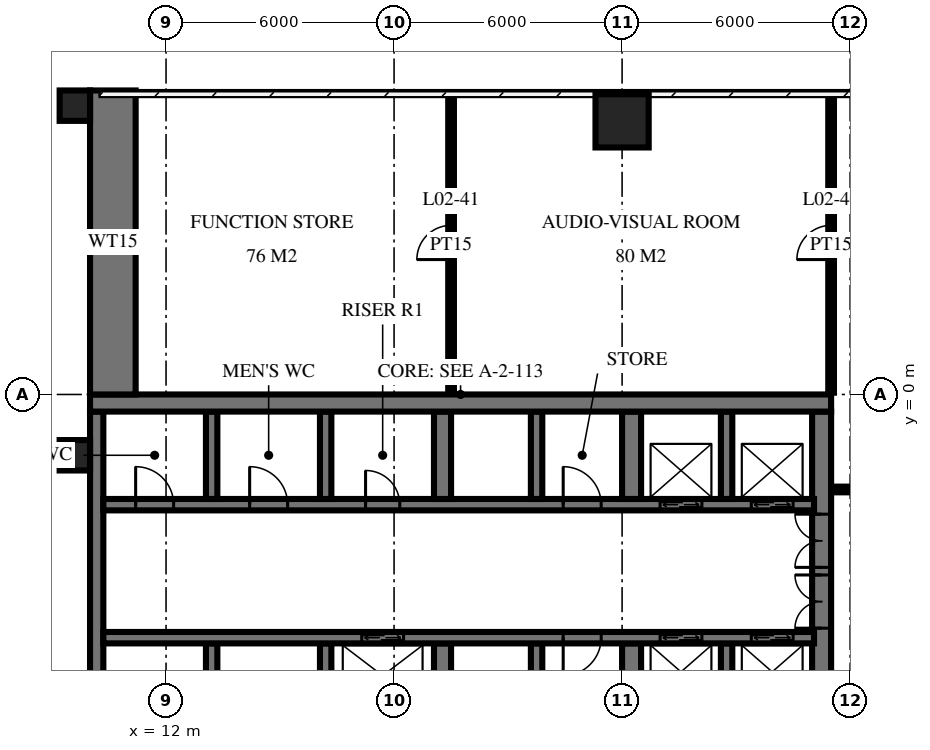
"""IFC4 building model, lengths in metres.
Left out: names, types, materials, properties, quantities, classifications, styles, units other than length and angle.
Written with IfcOpenShell. Run it as: python <this file> out.ifc"""

import sys

from ifc_helpers import new_model, si_unit, direction, frame, frame_2d, origin, origin_2d, place, context, subcontext, project, spatial, rectangle, circle, extrude, element, fill, save


model = new_model("IFC4")
c1 = context("Model", 3, precision=1e-05, world=origin(), true_north=direction((0.0, 1.0)))
c2 = subcontext(c1, "Body", "Model", "MODEL_VIEW")
j1 = project(units=[si_unit("LENGTHUNIT", "METRE"), si_unit("PLANEANGLEUNIT", "RADIAN")], contexts=[c1])
p1 = place(None, origin())
s1 = spatial("IfcSite", under=j1, at=p1, CompositionType="ELEMENT")
p2 = place(p1, origin())
s2 = spatial("IfcBuilding", under=s1, at=p2, CompositionType="ELEMENT")
p3 = place(p2, frame((0.0, 0.0, 12.5)))
s3 = spatial("IfcBuildingStorey", under=s2, at=p3, CompositionType="ELEMENT", Elevation=12.5)
p4 = place(p3, frame((24.0, 7.2, 0.0), z_axis=(0.0, 0.0, 1.0), x_axis=(1.0, 0.0, 0.0)))
e1 = element("IfcColumn", 1, at=p4, inside=s3, PredefinedType="COLUMN", context=c2, shape_type="SweptSolid", body=[
    extrude(circle(Radius=0.7, at=origin_2d()), origin(), (0.0, 0.0, 1.0), 5.5),
])
p5 = place(p3, frame((10.0, -0.225, 0.0), z_axis=(0.0, 0.0, 1.0), x_axis=(1.0, 0.0, 0.0)))
e2 = element("IfcWall", 2, at=p5, inside=s3, PredefinedType="SHEAR", context=c2, shape_type="SweptSolid", body=[
    extrude(rectangle(XDim=19.5, YDim=0.45, at=frame_2d((9.75, 0.0))), origin(), (0.0, 0.0, 1.0), 5.5),
])
p6 = place(p3, frame((10.175, -14.55, 0.0), z_axis=(0.0, 0.0, 1.0), x_axis=(0.0, 1.0, 0.0)))
e3 = element("IfcWall", 3, at=p6, inside=s3, PredefinedType="SHEAR", context=c2, shape_type="SweptSolid", body=[
    extrude(rectangle(XDim=14.1, YDim=0.35, at=frame_2d((7.05, 0.0))), origin(), (0.0, 0.0, 1.0), 5.5),
])
p7 = place(p3, frame((29.25, -14.55, 0.0), z_axis=(0.0, 0.0, 1.0), x_axis=(0.0, 1.0, 0.0)))
e4 = element("IfcWall", 4, at=p7, inside=s3, PredefinedType="SHEAR", context=c2, shape_type="SweptSolid", body=[
    extrude(rectangle(XDim=14.1, YDim=0.5, at=frame_2d((7.05, 0.0))), origin(), (0.0, 0.0, 1.0), 5.5),
])
p8 = place(p7, frame((8.4, 0.0, 0.0)))
e5 = element("IfcOpeningElement", 5, at=p8, cuts=e4, PredefinedType="OPENING", context=c2, shape_type="SweptSolid", body=[
    extrude(rectangle(XDim=1.4, YDim=2.4, at=frame_2d((0.7, 1.2))), frame((0.0, 0.26, 0.0), z_axis=(0.0, -1.0, 0.0), x_axis=(1.0, 0.0, 0.0)), (0.0, 0.0, 1.0), 0.52),
])
p9 = place(p7, frame((10.0, 0.0, 0.0)))
e6 = element("IfcOpeningElement", 6, at=p9, cuts=e4, PredefinedType="OPENING", context=c2, shape_type="SweptSolid", body=[
    extrude(rectangle(XDim=1.4, YDim=2.4, at=frame_2d((0.7, 1.2))), frame((0.0, 0.26, 0.0), z_axis=(0.0, -1.0, 0.0), x_axis=(1.0, 0.0, 0.0)), (0.0, 0.0, 1.0), 0.52),
])
p10 = place(p3, frame((10.35, -2.9, 0.0), z_axis=(0.0, 0.0, 1.0), x_axis=(1.0, 0.0, 0.0)))
e7 = element("IfcWall", 7, at=p10, inside=s3, PredefinedType="SHEAR", context=c2, shape_type="SweptSolid", body=[
    extrude(rectangle(XDim=18.7, YDim=0.3, at=frame_2d((9.35, 0.0))), origin(), (0.0, 0.0, 1.0), 5.5),
])
p11 = place(p10, frame((14.65, 0.0, 0.0)))
e8 = element("IfcOpeningElement", 8, at=p11, cuts=e7, PredefinedType="OPENING", context=c2, shape_type="SweptSolid", body=[
    extrude(rectangle(XDim=1.1, YDim=2.1, at=frame_2d((0.55, 1.05))), frame((0.0, 0.16, 0.0), z_axis=(0.0, -1.0, 0.0), x_axis=(1.0, 0.0, 0.0)), (0.0, 0.0, 1.0), 0.32),
])
p12 = place(p10, frame((17.05, 0.0, 0.0)))
e9 = element("IfcOpeningElement", 9, at=p12, cuts=e7, PredefinedType="OPENING", context=c2, shape_type="SweptSolid", body=[
    extrude(rectangle(XDim=1.1, YDim=2.1, at=frame_2d((0.55, 1.05))), frame((0.0, 0.16, 0.0), z_axis=(0.0, -1.0, 0.0), x_axis=(1.0, 0.0, 0.0)), (0.0, 0.0, 1.0), 0.32),
])
p13 = place(p10, frame((6.9, 0.0, 0.0)))
e10 = element("IfcOpeningElement", 10, at=p13, cuts=e7, PredefinedType="OPENING", context=c2, shape_type="SweptSolid", body=[
    extrude(rectangle(XDim=0.9, YDim=2.1, at=frame_2d((0.45, 1.05))), frame((0.0, 0.16, 0.0), z_axis=(0.0, -1.0, 0.0), x_axis=(1.0, 0.0, 0.0)), (0.0, 0.0, 1.0), 0.32),
])
p14 = place(p10, frame((0.85, 0.0, 0.0)))
e11 = element("IfcOpeningElement", 11, at=p14, cuts=e7, PredefinedType="OPENING", context=c2, shape_type="SweptSolid", body=[
    extrude(rectangle(XDim=1.0, YDim=2.1, at=frame_2d((0.5, 1.05))), frame((0.0, 0.16, 0.0), z_axis=(0.0, -1.0, 0.0), x_axis=(1.0, 0.0, 0.0)), (0.0, 0.0, 1.0), 0.32),
])
p15 = place(p10, frame((3.85, 0.0, 0.0)))
e12 = element("IfcOpeningElement", 12, at=p15, cuts=e7, PredefinedType="OPENING", context=c2, shape_type="SweptSolid", body=[
    extrude(rectangle(XDim=1.0, YDim=2.1, at=frame_2d((0.5, 1.05))), frame((0.0, 0.16, 0.0), z_axis=(0.0, -1.0, 0.0), x_axis=(1.0, 0.0, 0.0)), (0.0, 0.0, 1.0), 0.32),
])
p16 = place(p10, frame((12.1, 0.0, 0.0)))
e13 = element("IfcOpeningElement", 13, at=p16, cuts=e7, PredefinedType="OPENING", context=c2, shape_type="SweptSolid", body=[
    extrude(rectangle(XDim=1.0, YDim=2.1, at=frame_2d((0.5, 1.05))), frame((0.0, 0.16, 0.0), z_axis=(0.0, -1.0, 0.0), x_axis=(1.0, 0.0, 0.0)), (0.0, 0.0, 1.0), 0.32),
])
p17 = place(p3, frame((10.35, -6.4, 0.0), z_axis=(0.0, 0.0, 1.0), x_axis=(1.0, 0.0, 0.0)))
e14 = element("IfcWall", 14, at=p17, inside=s3, PredefinedType="SHEAR", context=c2, shape_type="SweptSolid", body=[
    extrude(rectangle(XDim=18.7, YDim=0.3, at=frame_2d((9.35, 0.0))), origin(), (0.0, 0.0, 1.0), 5.5),
])
p18 = place(p17, frame((14.65, 0.0, 0.0)))
e15 = element("IfcOpeningElement", 15, at=p18, cuts=e14, PredefinedType="OPENING", context=c2, shape_type="SweptSolid", body=[
    extrude(rectangle(XDim=1.1, YDim=2.1, at=frame_2d((0.55, 1.05))), frame((0.0, 0.16, 0.0), z_axis=(0.0, -1.0, 0.0), x_axis=(1.0, 0.0, 0.0)), (0.0, 0.0, 1.0), 0.32),
])
p19 = place(p17, frame((17.05, 0.0, 0.0)))
e16 = element("IfcOpeningElement", 16, at=p19, cuts=e14, PredefinedType="OPENING", context=c2, shape_type="SweptSolid", body=[
    extrude(rectangle(XDim=1.1, YDim=2.1, at=frame_2d((0.55, 1.05))), frame((0.0, 0.16, 0.0), z_axis=(0.0, -1.0, 0.0), x_axis=(1.0, 0.0, 0.0)), (0.0, 0.0, 1.0), 0.32),
])
p20 = place(p17, frame((6.8, 0.0, 0.0)))
e17 = element("IfcOpeningElement", 17, at=p20, cuts=e14, PredefinedType="OPENING", context=c2, shape_type="SweptSolid", body=[
    extrude(rectangle(XDim=1.1, YDim=2.1, at=frame_2d((0.55, 1.05))), frame((0.0, 0.16, 0.0), z_axis=(0.0, -1.0, 0.0), x_axis=(1.0, 0.0, 0.0)), (0.0, 0.0, 1.0), 0.32),
])
p21 = place(p17, frame((12.1, 0.0, 0.0)))
e18 = element("IfcOpeningElement", 18, at=p21, cuts=e14, PredefinedType="OPENING", context=c2, shape_type="SweptSolid", body=[
    extrude(rectangle(XDim=1.0, YDim=2.1, at=frame_2d((0.5, 1.05))), frame((0.0, 0.16, 0.0), z_axis=(0.0, -1.0, 0.0), x_axis=(1.0, 0.0, 0.0)), (0.0, 0.0, 1.0), 0.32),
])
for number, where, z_axis, x_axis in (
    (19, (13.2, -2.75, 0.0), (0.0, 0.0, 1.0), (0.0, 1.0, 0.0)),
    (20, (13.2, -8.85, 0.0), (0.0, 0.0, 1.0), (0.0, 1.0, 0.0)),
    (21, (16.2, -2.75, 0.0), (0.0, 0.0, 1.0), (0.0, 1.0, 0.0)),
    (22, (16.2, -8.85, 0.0), (0.0, 0.0, 1.0), (0.0, 1.0, 0.0)),
):
    element("IfcWall", number, at=place(p3, frame(where, z_axis=z_axis, x_axis=x_axis)), inside=s3, PredefinedType="SHEAR", context=c2, shape_type="SweptSolid", body=[
        extrude(rectangle(XDim=2.3, YDim=0.3, at=frame_2d((1.15, 0.0))), origin(), (0.0, 0.0, 1.0), 5.5),
    ])
for number, where, z_axis, x_axis in (
    (23, (19.275, -2.75, 0.0), (0.0, 0.0, 1.0), (0.0, 1.0, 0.0)),
    (24, (19.275, -8.85, 0.0), (0.0, 0.0, 1.0), (0.0, 1.0, 0.0)),
):
    element("IfcWall", number, at=place(p3, frame(where, z_axis=z_axis, x_axis=x_axis)), inside=s3, PredefinedType="SHEAR", context=c2, shape_type="SweptSolid", body=[
        extrude(rectangle(XDim=2.3, YDim=0.45, at=frame_2d((1.15, 0.0))), origin(), (0.0, 0.0, 1.0), 5.5),
    ])
for number, where, z_axis, x_axis in (
    (25, (21.75, -2.75, 0.0), (0.0, 0.0, 1.0), (0.0, 1.0, 0.0)),
    (26, (21.75, -8.85, 0.0), (0.0, 0.0, 1.0), (0.0, 1.0, 0.0)),
):
    element("IfcWall", number, at=place(p3, frame(where, z_axis=z_axis, x_axis=x_axis)), inside=s3, PredefinedType="SHEAR", context=c2, shape_type="SweptSolid", body=[
        extrude(rectangle(XDim=2.3, YDim=0.3, at=frame_2d((1.15, 0.0))), origin(), (0.0, 0.0, 1.0), 5.5),
    ])
for number, where, z_axis, x_axis in (
    (27, (24.25, -2.75, 0.0), (0.0, 0.0, 1.0), (0.0, 1.0, 0.0)),
    (28, (24.25, -8.85, 0.0), (0.0, 0.0, 1.0), (0.0, 1.0, 0.0)),
):
    element("IfcWall", number, at=place(p3, frame(where, z_axis=z_axis, x_axis=x_axis)), inside=s3, PredefinedType="SHEAR", context=c2, shape_type="SweptSolid", body=[
        extrude(rectangle(XDim=2.3, YDim=0.5, at=frame_2d((1.15, 0.0))), origin(), (0.0, 0.0, 1.0), 5.5),
    ])
for number, where, z_axis, x_axis in (
    (29, (26.75, -2.75, 0.0), (0.0, 0.0, 1.0), (0.0, 1.0, 0.0)),
    (30, (26.75, -8.85, 0.0), (0.0, 0.0, 1.0), (0.0, 1.0, 0.0)),
):
    element("IfcWall", number, at=place(p3, frame(where, z_axis=z_axis, x_axis=x_axis)), inside=s3, PredefinedType="SHEAR", context=c2, shape_type="SweptSolid", body=[
        extrude(rectangle(XDim=2.3, YDim=0.3, at=frame_2d((1.15, 0.0))), origin(), (0.0, 0.0, 1.0), 5.5),
    ])
p22 = place(p3, frame((10.6, 0.0, 0.0), z_axis=(0.0, 0.0, 1.0), x_axis=(0.0, 1.0, 0.0)))
e31 = element("IfcWall", 31, at=p22, inside=s3, PredefinedType="SHEAR", context=c2, shape_type="SweptSolid", body=[
    extrude(rectangle(XDim=8.0, YDim=1.2, at=frame_2d((4.0, 0.0))), origin(), (0.0, 0.0, 1.0), 5.5),
])
for number, where, z_axis, x_axis in (
    (32, (9.6, -1.6, 0.0), (0.0, 0.0, 1.0), (1.0, 0.0, 0.0)),
    (33, (9.6, 7.6, 0.0), (0.0, 0.0, 1.0), (1.0, 0.0, 0.0)),
):
    element("IfcColumn", number, at=place(p3, frame(where, z_axis=z_axis, x_axis=x_axis)), inside=s3, PredefinedType="COLUMN", context=c2, shape_type="SweptSolid", body=[
        extrude(rectangle(XDim=0.8, YDim=0.8, at=origin_2d()), origin(), (0.0, 0.0, 1.0), 4.25),
    ])
p23 = place(p3, frame((29.5, 0.05, 0.0), z_axis=(0.0, 0.0, 1.0), x_axis=(0.0, 1.0, 0.0)))
e34 = element("IfcWall", 34, at=p23, inside=s3, PredefinedType="PARTITIONING", context=c2, shape_type="SweptSolid", body=[
    extrude(rectangle(XDim=7.77, YDim=0.15, at=frame_2d((3.885, 0.0))), origin(), (0.0, 0.0, 1.0), 5.05),
])
p24 = place(p23, frame((3.5, 0.0, 0.0)))
e35 = element("IfcOpeningElement", 35, at=p24, cuts=e34, PredefinedType="OPENING", context=c2, shape_type="SweptSolid", body=[
    extrude(rectangle(XDim=0.9, YDim=2.1, at=frame_2d((0.45, 1.05))), frame((0.0, 0.085, 0.0), z_axis=(0.0, -1.0, 0.0), x_axis=(1.0, 0.0, 0.0)), (0.0, 0.0, 1.0), 0.17),
])
p25 = place(p3, frame((19.5, 0.05, 0.0), z_axis=(0.0, 0.0, 1.0), x_axis=(0.0, 1.0, 0.0)))
e36 = element("IfcWall", 36, at=p25, inside=s3, PredefinedType="PARTITIONING", context=c2, shape_type="SweptSolid", body=[
    extrude(rectangle(XDim=7.77, YDim=0.15, at=frame_2d((3.885, 0.0))), origin(), (0.0, 0.0, 1.0), 5.05),
])
p26 = place(p25, frame((3.5, 0.0, 0.0)))
e37 = element("IfcOpeningElement", 37, at=p26, cuts=e36, PredefinedType="OPENING", context=c2, shape_type="SweptSolid", body=[
    extrude(rectangle(XDim=0.9, YDim=2.1, at=frame_2d((0.45, 1.05))), frame((0.0, 0.085, 0.0), z_axis=(0.0, -1.0, 0.0), x_axis=(1.0, 0.0, 0.0)), (0.0, 0.0, 1.0), 0.17),
])
p27 = place(p3, frame((29.55, -2.5, 0.0), z_axis=(0.0, 0.0, 1.0), x_axis=(1.0, 0.0, 0.0)))
e38 = element("IfcWall", 38, at=p27, inside=s3, PredefinedType="PARTITIONING", context=c2, shape_type="SweptSolid", body=[
    extrude(rectangle(XDim=2.35, YDim=0.15, at=frame_2d((1.175, 0.0))), origin(), (0.0, 0.0, 1.0), 5.05),
])
p28 = place(p11, origin())
e39 = element("IfcDoor", 39, at=p28, inside=s3, OperationType="DOUBLE_DOOR_SLIDING", PredefinedType="USERDEFINED", context=c2, shape_type="SweptSolid", body=[
    extrude(rectangle(XDim=1.1, YDim=2.1, at=frame_2d((0.55, 1.05))), frame((0.0, 0.025, 0.0), z_axis=(0.0, -1.0, 0.0), x_axis=(1.0, 0.0, 0.0)), (0.0, 0.0, 1.0), 0.05),
])
fill(e8, e39)
p29 = place(p12, origin())
e40 = element("IfcDoor", 40, at=p29, inside=s3, OperationType="DOUBLE_DOOR_SLIDING", PredefinedType="USERDEFINED", context=c2, shape_type="SweptSolid", body=[
    extrude(rectangle(XDim=1.1, YDim=2.1, at=frame_2d((0.55, 1.05))), frame((0.0, 0.025, 0.0), z_axis=(0.0, -1.0, 0.0), x_axis=(1.0, 0.0, 0.0)), (0.0, 0.0, 1.0), 0.05),
])
fill(e9, e40)
p30 = place(p18, origin())
e41 = element("IfcDoor", 41, at=p30, inside=s3, OperationType="DOUBLE_DOOR_SLIDING", PredefinedType="USERDEFINED", context=c2, shape_type="SweptSolid", body=[
    extrude(rectangle(XDim=1.1, YDim=2.1, at=frame_2d((0.55, 1.05))), frame((0.0, 0.025, 0.0), z_axis=(0.0, -1.0, 0.0), x_axis=(1.0, 0.0, 0.0)), (0.0, 0.0, 1.0), 0.05),
])
fill(e15, e41)
p31 = place(p19, origin())
e42 = element("IfcDoor", 42, at=p31, inside=s3, OperationType="DOUBLE_DOOR_SLIDING", PredefinedType="USERDEFINED", context=c2, shape_type="SweptSolid", body=[
    extrude(rectangle(XDim=1.1, YDim=2.1, at=frame_2d((0.55, 1.05))), frame((0.0, 0.025, 0.0), z_axis=(0.0, -1.0, 0.0), x_axis=(1.0, 0.0, 0.0)), (0.0, 0.0, 1.0), 0.05),
])
fill(e16, e42)
p32 = place(p20, origin())
e43 = element("IfcDoor", 43, at=p32, inside=s3, OperationType="DOUBLE_DOOR_SLIDING", PredefinedType="USERDEFINED", context=c2, shape_type="SweptSolid", body=[
    extrude(rectangle(XDim=1.1, YDim=2.1, at=frame_2d((0.55, 1.05))), frame((0.0, 0.025, 0.0), z_axis=(0.0, -1.0, 0.0), x_axis=(1.0, 0.0, 0.0)), (0.0, 0.0, 1.0), 0.05),
])
fill(e17, e43)
p33 = place(p8, origin())
e44 = element("IfcDoor", 44, at=p33, inside=s3, OperationType="DOUBLE_DOOR_SINGLE_SWING", PredefinedType="DOOR", context=c2, shape_type="SweptSolid", body=[
    extrude(rectangle(XDim=1.4, YDim=2.4, at=frame_2d((0.7, 1.2))), frame((0.0, 0.025, 0.0), z_axis=(0.0, -1.0, 0.0), x_axis=(1.0, 0.0, 0.0)), (0.0, 0.0, 1.0), 0.05),
])
fill(e5, e44)
p34 = place(p9, origin())
e45 = element("IfcDoor", 45, at=p34, inside=s3, OperationType="DOUBLE_DOOR_SINGLE_SWING", PredefinedType="DOOR", context=c2, shape_type="SweptSolid", body=[
    extrude(rectangle(XDim=1.4, YDim=2.4, at=frame_2d((0.7, 1.2))), frame((0.0, 0.025, 0.0), z_axis=(0.0, -1.0, 0.0), x_axis=(1.0, 0.0, 0.0)), (0.0, 0.0, 1.0), 0.05),
])
fill(e6, e45)
p35 = place(p13, origin())
e46 = element("IfcDoor", 46, at=p35, inside=s3, OperationType="SINGLE_SWING_RIGHT", PredefinedType="DOOR", context=c2, shape_type="SweptSolid", body=[
    extrude(rectangle(XDim=0.9, YDim=2.1, at=frame_2d((0.45, 1.05))), frame((0.0, 0.025, 0.0), z_axis=(0.0, -1.0, 0.0), x_axis=(1.0, 0.0, 0.0)), (0.0, 0.0, 1.0), 0.05),
])
fill(e10, e46)
p36 = place(p14, origin())
e47 = element("IfcDoor", 47, at=p36, inside=s3, OperationType="SINGLE_SWING_RIGHT", PredefinedType="DOOR", context=c2, shape_type="SweptSolid", body=[
    extrude(rectangle(XDim=1.0, YDim=2.1, at=frame_2d((0.5, 1.05))), frame((0.0, 0.025, 0.0), z_axis=(0.0, -1.0, 0.0), x_axis=(1.0, 0.0, 0.0)), (0.0, 0.0, 1.0), 0.05),
])
fill(e11, e47)
p37 = place(p15, origin())
e48 = element("IfcDoor", 48, at=p37, inside=s3, OperationType="SINGLE_SWING_RIGHT", PredefinedType="DOOR", context=c2, shape_type="SweptSolid", body=[
    extrude(rectangle(XDim=1.0, YDim=2.1, at=frame_2d((0.5, 1.05))), frame((0.0, 0.025, 0.0), z_axis=(0.0, -1.0, 0.0), x_axis=(1.0, 0.0, 0.0)), (0.0, 0.0, 1.0), 0.05),
])
fill(e12, e48)
p38 = place(p16, origin())
e49 = element("IfcDoor", 49, at=p38, inside=s3, OperationType="SINGLE_SWING_RIGHT", PredefinedType="DOOR", context=c2, shape_type="SweptSolid", body=[
    extrude(rectangle(XDim=1.0, YDim=2.1, at=frame_2d((0.5, 1.05))), frame((0.0, 0.025, 0.0), z_axis=(0.0, -1.0, 0.0), x_axis=(1.0, 0.0, 0.0)), (0.0, 0.0, 1.0), 0.05),
])
fill(e13, e49)
p39 = place(p21, frame((0.5, 0.0, 0.0), z_axis=(0.0, 0.0, 1.0), x_axis=(-1.0, 0.0, 0.0)))
e50 = element("IfcDoor", 50, at=p39, inside=s3, OperationType="SINGLE_SWING_LEFT", PredefinedType="DOOR", context=c2, shape_type="SweptSolid", body=[
    extrude(rectangle(XDim=1.0, YDim=2.1, at=frame_2d((0.0, 1.05))), frame((0.0, -0.025, 0.0), z_axis=(0.0, 1.0, 0.0), x_axis=(-1.0, 0.0, 0.0)), (0.0, 0.0, 1.0), 0.05),
])
fill(e18, e50)
p40 = place(p24, origin())
e51 = element("IfcDoor", 51, at=p40, inside=s3, OperationType="SINGLE_SWING_RIGHT", PredefinedType="DOOR", context=c2, shape_type="SweptSolid", body=[
    extrude(rectangle(XDim=0.9, YDim=2.1, at=frame_2d((0.45, 1.05))), frame((0.0, 0.025, 0.0), z_axis=(0.0, -1.0, 0.0), x_axis=(1.0, 0.0, 0.0)), (0.0, 0.0, 1.0), 0.05),
])
fill(e35, e51)
p41 = place(p26, origin())
e52 = element("IfcDoor", 52, at=p41, inside=s3, OperationType="SINGLE_SWING_RIGHT", PredefinedType="DOOR", context=c2, shape_type="SweptSolid", body=[
    extrude(rectangle(XDim=0.9, YDim=2.1, at=frame_2d((0.45, 1.05))), frame((0.0, 0.025, 0.0), z_axis=(0.0, -1.0, 0.0), x_axis=(1.0, 0.0, 0.0)), (0.0, 0.0, 1.0), 0.05),
])
fill(e37, e52)
save(model, sys.argv[1])
